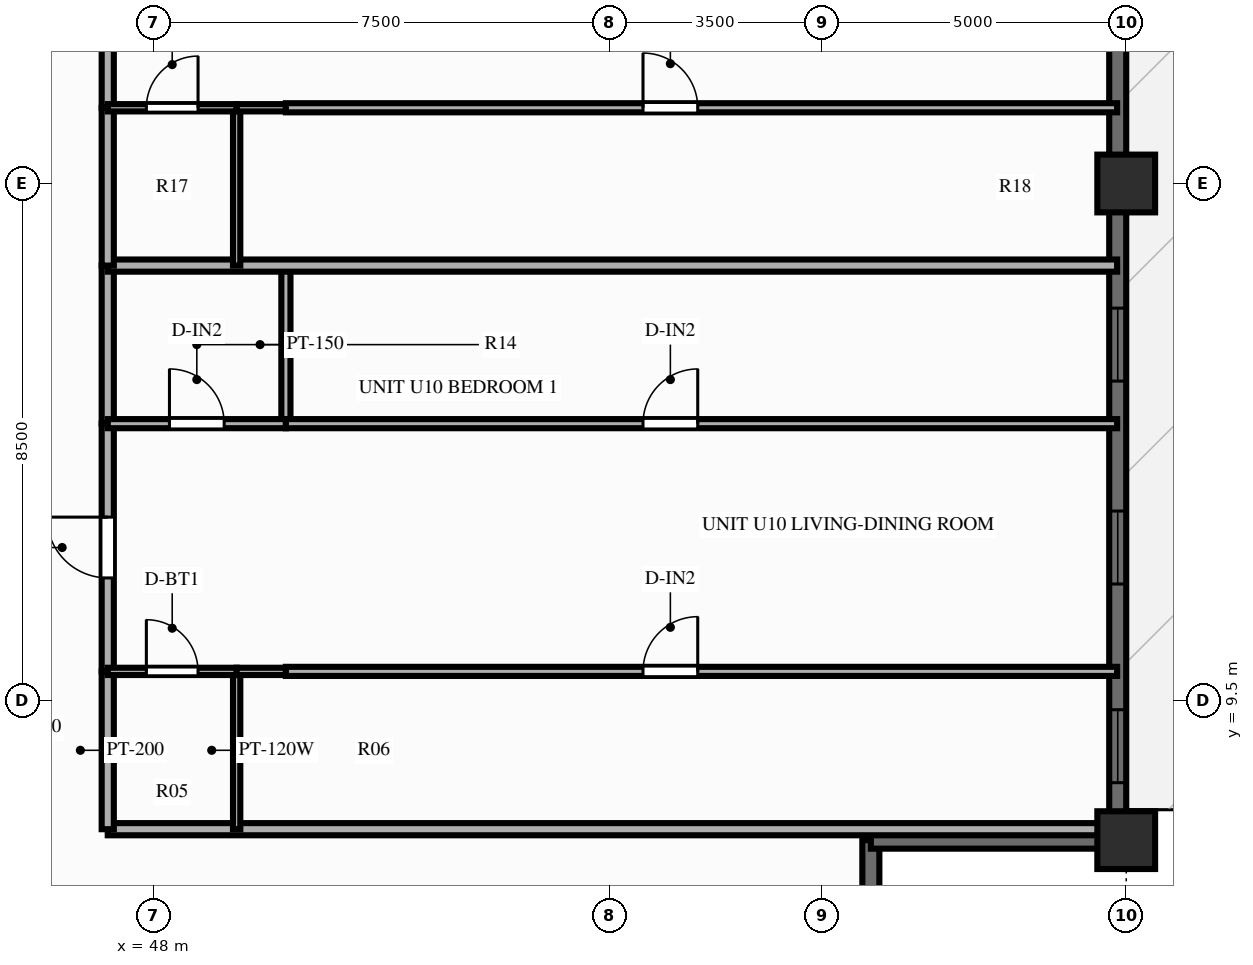
"""IFC4 building model, lengths in metres.
Left out: names, types, materials, properties, quantities, classifications, styles, units other than length and angle.
Written with IfcOpenShell. Run it as: python <this file> out.ifc"""

import sys

from ifc_helpers import new_model, si_unit, direction, frame, frame_2d, origin, origin_2d, place, context, subcontext, project, spatial, rectangle, extrude, source, transform, mapped, element, fill, save


model = new_model("IFC4")
c1 = context("Model", 3, precision=1e-05, world=origin(), true_north=direction((0.0, 1.0)))
c2 = subcontext(c1, "Body", "Model", "MODEL_VIEW")
j1 = project(units=[si_unit("LENGTHUNIT", "METRE"), si_unit("PLANEANGLEUNIT", "RADIAN")], contexts=[c1])
p1 = place(None, origin())
s1 = spatial("IfcSite", under=j1, at=p1, CompositionType="ELEMENT")
p2 = place(p1, origin())
s2 = spatial("IfcBuilding", under=s1, at=p2, CompositionType="ELEMENT")
p3 = place(p2, frame((0.0, 0.0, 104.85)))
s3 = spatial("IfcBuildingStorey", under=s2, at=p3, CompositionType="ELEMENT", Elevation=104.85)
m1 = source(origin(), c2, "Body", "SweptSolid", [
    extrude(rectangle(XDim=0.95, YDim=0.95, at=origin_2d()), origin(), (0.0, 0.0, 1.0), 3.0),
])
for number, where, z_axis, x_axis in (
    (1, (64.0, 7.2, 0.0), (0.0, 0.0, 1.0), (1.0, 0.0, 0.0)),
    (2, (64.0, 18.0, 0.0), (0.0, 0.0, 1.0), (1.0, 0.0, 0.0)),
):
    element("IfcColumn", number, at=place(p3, frame(where, z_axis=z_axis, x_axis=x_axis)), inside=s3, PredefinedType="COLUMN", context=c2, shape_type="MappedRepresentation", body=[
        mapped(m1, transform((0.0, 0.0, 0.0), scale=1.0)),
    ])
p4 = place(p3, frame((63.86, 7.2, 0.0), z_axis=(0.0, 0.0, 1.0), x_axis=(0.0, 1.0, 0.0)))
e3 = element("IfcWall", 3, at=p4, inside=s3, PredefinedType="SOLIDWALL", context=c2, shape_type="SweptSolid", body=[
    extrude(rectangle(XDim=39.6, YDim=0.28, at=frame_2d((19.8, 0.0))), origin(), (0.0, 0.0, 1.0), 2.28),
])
p5 = place(p4, frame((0.945, 0.0, 0.25)))
e4 = element("IfcOpeningElement", 4, at=p5, cuts=e3, PredefinedType="OPENING", context=c2, shape_type="SweptSolid", body=[
    extrude(rectangle(XDim=1.2, YDim=1.5, at=frame_2d((0.6, 0.75))), frame((0.0, 0.152, 0.0), z_axis=(0.0, -1.0, 0.0), x_axis=(1.0, 0.0, 0.0)), (0.0, 0.0, 1.0), 0.304),
])
p6 = place(p4, frame((4.213, 0.0, 0.25)))
e5 = element("IfcOpeningElement", 5, at=p6, cuts=e3, PredefinedType="OPENING", context=c2, shape_type="SweptSolid", body=[
    extrude(rectangle(XDim=1.2, YDim=1.5, at=frame_2d((0.6, 0.75))), frame((0.0, 0.152, 0.0), z_axis=(0.0, -1.0, 0.0), x_axis=(1.0, 0.0, 0.0)), (0.0, 0.0, 1.0), 0.304),
])
p7 = place(p4, frame((7.55, 0.0, 0.25)))
e6 = element("IfcOpeningElement", 6, at=p7, cuts=e3, PredefinedType="OPENING", context=c2, shape_type="SweptSolid", body=[
    extrude(rectangle(XDim=1.2, YDim=1.5, at=frame_2d((0.6, 0.75))), frame((0.0, 0.152, 0.0), z_axis=(0.0, -1.0, 0.0), x_axis=(1.0, 0.0, 0.0)), (0.0, 0.0, 1.0), 0.304),
])
p8 = place(p4, frame((13.483, 0.0, 0.25)))
e7 = element("IfcOpeningElement", 7, at=p8, cuts=e3, PredefinedType="OPENING", context=c2, shape_type="SweptSolid", body=[
    extrude(rectangle(XDim=1.2, YDim=1.5, at=frame_2d((0.6, 0.75))), frame((0.0, 0.152, 0.0), z_axis=(0.0, -1.0, 0.0), x_axis=(1.0, 0.0, 0.0)), (0.0, 0.0, 1.0), 0.304),
])
p9 = place(p4, frame((16.82, 0.0, 0.25)))
e8 = element("IfcOpeningElement", 8, at=p9, cuts=e3, PredefinedType="OPENING", context=c2, shape_type="SweptSolid", body=[
    extrude(rectangle(XDim=1.2, YDim=1.5, at=frame_2d((0.6, 0.75))), frame((0.0, 0.152, 0.0), z_axis=(0.0, -1.0, 0.0), x_axis=(1.0, 0.0, 0.0)), (0.0, 0.0, 1.0), 0.304),
])
p10 = place(p4, frame((19.2, 0.0, 0.25)))
e9 = element("IfcOpeningElement", 9, at=p10, cuts=e3, PredefinedType="OPENING", context=c2, shape_type="SweptSolid", body=[
    extrude(rectangle(XDim=1.2, YDim=1.5, at=frame_2d((0.6, 0.75))), frame((0.0, 0.152, 0.0), z_axis=(0.0, -1.0, 0.0), x_axis=(1.0, 0.0, 0.0)), (0.0, 0.0, 1.0), 0.304),
])
p11 = place(p4, frame((21.578, 0.0, 0.25)))
e10 = element("IfcOpeningElement", 10, at=p11, cuts=e3, PredefinedType="OPENING", context=c2, shape_type="SweptSolid", body=[
    extrude(rectangle(XDim=1.2, YDim=1.5, at=frame_2d((0.6, 0.75))), frame((0.0, 0.152, 0.0), z_axis=(0.0, -1.0, 0.0), x_axis=(1.0, 0.0, 0.0)), (0.0, 0.0, 1.0), 0.304),
])
p12 = place(p4, frame((26.313, 0.0, 0.0), z_axis=(0.0, 0.0, 1.0), x_axis=(-1.0, 0.0, 0.0)))
e11 = element("IfcOpeningElement", 11, at=p12, cuts=e3, PredefinedType="OPENING", context=c2, shape_type="SweptSolid", body=[
    extrude(rectangle(XDim=1.6, YDim=2.15, at=frame_2d((0.8, 1.075))), frame((0.0, 0.152, 0.0), z_axis=(0.0, -1.0, 0.0), x_axis=(1.0, 0.0, 0.0)), (0.0, 0.0, 1.0), 0.304),
])
p13 = place(p4, frame((29.305, 0.0, 0.25)))
e12 = element("IfcOpeningElement", 12, at=p13, cuts=e3, PredefinedType="OPENING", context=c2, shape_type="SweptSolid", body=[
    extrude(rectangle(XDim=0.7, YDim=1.5, at=frame_2d((0.35, 0.75))), frame((0.0, 0.152, 0.0), z_axis=(0.0, -1.0, 0.0), x_axis=(1.0, 0.0, 0.0)), (0.0, 0.0, 1.0), 0.304),
])
p14 = place(p4, frame((30.848, 0.0, 0.25)))
e13 = element("IfcOpeningElement", 13, at=p14, cuts=e3, PredefinedType="OPENING", context=c2, shape_type="SweptSolid", body=[
    extrude(rectangle(XDim=1.2, YDim=1.5, at=frame_2d((0.6, 0.75))), frame((0.0, 0.152, 0.0), z_axis=(0.0, -1.0, 0.0), x_axis=(1.0, 0.0, 0.0)), (0.0, 0.0, 1.0), 0.304),
])
p15 = place(p4, frame((34.183, 0.0, 0.25)))
e14 = element("IfcOpeningElement", 14, at=p15, cuts=e3, PredefinedType="OPENING", context=c2, shape_type="SweptSolid", body=[
    extrude(rectangle(XDim=1.2, YDim=1.5, at=frame_2d((0.6, 0.75))), frame((0.0, 0.152, 0.0), z_axis=(0.0, -1.0, 0.0), x_axis=(1.0, 0.0, 0.0)), (0.0, 0.0, 1.0), 0.304),
])
p16 = place(p4, frame((37.452, 0.0, 0.25)))
e15 = element("IfcOpeningElement", 15, at=p16, cuts=e3, PredefinedType="OPENING", context=c2, shape_type="SweptSolid", body=[
    extrude(rectangle(XDim=1.2, YDim=1.5, at=frame_2d((0.6, 0.75))), frame((0.0, 0.152, 0.0), z_axis=(0.0, -1.0, 0.0), x_axis=(1.0, 0.0, 0.0)), (0.0, 0.0, 1.0), 0.304),
])
for number, where, z_axis, x_axis in (
    (16, (59.8, 3.08, 0.0), (0.0, 0.0, 1.0), (0.0, 1.0, 0.0)),
    (17, (59.8, 7.2, 0.0), (0.0, 0.0, 1.0), (1.0, 0.0, 0.0)),
):
    element("IfcWall", number, at=place(p3, frame(where, z_axis=z_axis, x_axis=x_axis)), inside=s3, PredefinedType="SOLIDWALL", context=c2, shape_type="SweptSolid", body=[
        extrude(rectangle(XDim=4.12, YDim=0.28, at=frame_2d((2.06, 0.0))), origin(), (0.0, 0.0, 1.0), 2.28),
    ])
p17 = place(p3, frame((47.25, 7.38, 0.0), z_axis=(0.0, 0.0, 1.0), x_axis=(1.0, 0.0, 0.0)))
e18 = element("IfcWall", 18, at=p17, inside=s3, PredefinedType="PARTITIONING", context=c2, shape_type="SweptSolid", body=[
    extrude(rectangle(XDim=16.6, YDim=0.2, at=frame_2d((8.3, 0.0))), origin(), (0.0, 0.0, 1.0), 2.79),
])
p18 = place(p3, frame((47.25, 7.38, 0.0), z_axis=(0.0, 0.0, 1.0), x_axis=(0.0, 1.0, 0.0)))
e19 = element("IfcWall", 19, at=p18, inside=s3, PredefinedType="PARTITIONING", context=c2, shape_type="SweptSolid", body=[
    extrude(rectangle(XDim=2.596, YDim=0.2, at=frame_2d((1.298, 0.0))), origin(), (0.0, 0.0, 1.0), 2.79),
])
p19 = place(p3, frame((47.25, 9.976, 0.0), z_axis=(0.0, 0.0, 1.0), x_axis=(0.0, 1.0, 0.0)))
e20 = element("IfcWall", 20, at=p19, inside=s3, PredefinedType="PARTITIONING", context=c2, shape_type="SweptSolid", body=[
    extrude(rectangle(XDim=4.074, YDim=0.2, at=frame_2d((2.037, 0.0))), origin(), (0.0, 0.0, 1.0), 2.79),
])
p20 = place(p19, frame((1.537, 0.0, 0.0)))
e21 = element("IfcOpeningElement", 21, at=p20, cuts=e20, PredefinedType="OPENING", context=c2, shape_type="SweptSolid", body=[
    extrude(rectangle(XDim=1.0, YDim=2.15, at=frame_2d((0.5, 1.075))), frame((0.0, 0.112, 0.0), z_axis=(0.0, -1.0, 0.0), x_axis=(1.0, 0.0, 0.0)), (0.0, 0.0, 1.0), 0.224),
])
p21 = place(p3, frame((47.25, 14.05, 0.0), z_axis=(0.0, 0.0, 1.0), x_axis=(0.0, 1.0, 0.0)))
e22 = element("IfcWall", 22, at=p21, inside=s3, PredefinedType="PARTITIONING", context=c2, shape_type="SweptSolid", body=[
    extrude(rectangle(XDim=2.6, YDim=0.2, at=frame_2d((1.3, 0.0))), origin(), (0.0, 0.0, 1.0), 2.79),
])
p22 = place(p3, frame((49.37, 7.38, 0.0), z_axis=(0.0, 0.0, 1.0), x_axis=(0.0, 1.0, 0.0)))
e23 = element("IfcWall", 23, at=p22, inside=s3, PredefinedType="PARTITIONING", context=c2, shape_type="SweptSolid", body=[
    extrude(rectangle(XDim=2.596, YDim=0.12, at=frame_2d((1.298, 0.0))), origin(), (0.0, 0.0, 1.0), 2.79),
])
p23 = place(p3, frame((50.18, 14.05, 0.0), z_axis=(0.0, 0.0, 1.0), x_axis=(0.0, 1.0, 0.0)))
e24 = element("IfcWall", 24, at=p23, inside=s3, PredefinedType="PARTITIONING", context=c2, shape_type="SweptSolid", body=[
    extrude(rectangle(XDim=2.6, YDim=0.15, at=frame_2d((1.3, 0.0))), origin(), (0.0, 0.0, 1.0), 2.79),
])
p24 = place(p3, frame((47.25, 9.976, 0.0), z_axis=(0.0, 0.0, 1.0), x_axis=(1.0, 0.0, 0.0)))
e25 = element("IfcWall", 25, at=p24, inside=s3, PredefinedType="PARTITIONING", context=c2, shape_type="SweptSolid", body=[
    extrude(rectangle(XDim=2.12, YDim=0.12, at=frame_2d((1.06, 0.0))), origin(), (0.0, 0.0, 1.0), 2.79),
])
p25 = place(p24, frame((0.635, 0.0, 0.0)))
e26 = element("IfcOpeningElement", 26, at=p25, cuts=e25, PredefinedType="OPENING", context=c2, shape_type="SweptSolid", body=[
    extrude(rectangle(XDim=0.85, YDim=2.05, at=frame_2d((0.425, 1.025))), frame((0.0, 0.072, 0.0), z_axis=(0.0, -1.0, 0.0), x_axis=(1.0, 0.0, 0.0)), (0.0, 0.0, 1.0), 0.144),
])
p26 = place(p3, frame((49.37, 9.976, 0.0), z_axis=(0.0, 0.0, 1.0), x_axis=(1.0, 0.0, 0.0)))
e27 = element("IfcWall", 27, at=p26, inside=s3, PredefinedType="PARTITIONING", context=c2, shape_type="SweptSolid", body=[
    extrude(rectangle(XDim=0.81, YDim=0.12, at=frame_2d((0.405, 0.0))), origin(), (0.0, 0.0, 1.0), 2.79),
])
p27 = place(p3, frame((50.18, 9.976, 0.0), z_axis=(0.0, 0.0, 1.0), x_axis=(1.0, 0.0, 0.0)))
e28 = element("IfcWall", 28, at=p27, inside=s3, PredefinedType="PARTITIONING", context=c2, shape_type="SweptSolid", body=[
    extrude(rectangle(XDim=13.67, YDim=0.15, at=frame_2d((6.835, 0.0))), origin(), (0.0, 0.0, 1.0), 2.79),
])
p28 = place(p27, frame((5.873, 0.0, 0.0)))
e29 = element("IfcOpeningElement", 29, at=p28, cuts=e28, PredefinedType="OPENING", context=c2, shape_type="SweptSolid", body=[
    extrude(rectangle(XDim=0.9, YDim=2.1, at=frame_2d((0.45, 1.05))), frame((0.0, 0.087, 0.0), z_axis=(0.0, -1.0, 0.0), x_axis=(1.0, 0.0, 0.0)), (0.0, 0.0, 1.0), 0.174),
])
p29 = place(p3, frame((47.25, 14.05, 0.0), z_axis=(0.0, 0.0, 1.0), x_axis=(1.0, 0.0, 0.0)))
e30 = element("IfcWall", 30, at=p29, inside=s3, PredefinedType="PARTITIONING", context=c2, shape_type="SweptSolid", body=[
    extrude(rectangle(XDim=2.93, YDim=0.15, at=frame_2d((1.465, 0.0))), origin(), (0.0, 0.0, 1.0), 2.79),
])
p30 = place(p29, frame((1.015, 0.0, 0.0)))
e31 = element("IfcOpeningElement", 31, at=p30, cuts=e30, PredefinedType="OPENING", context=c2, shape_type="SweptSolid", body=[
    extrude(rectangle(XDim=0.9, YDim=2.1, at=frame_2d((0.45, 1.05))), frame((0.0, 0.087, 0.0), z_axis=(0.0, -1.0, 0.0), x_axis=(1.0, 0.0, 0.0)), (0.0, 0.0, 1.0), 0.174),
])
p31 = place(p3, frame((50.18, 14.05, 0.0), z_axis=(0.0, 0.0, 1.0), x_axis=(1.0, 0.0, 0.0)))
e32 = element("IfcWall", 32, at=p31, inside=s3, PredefinedType="PARTITIONING", context=c2, shape_type="SweptSolid", body=[
    extrude(rectangle(XDim=13.67, YDim=0.15, at=frame_2d((6.835, 0.0))), origin(), (0.0, 0.0, 1.0), 2.79),
])
p32 = place(p31, frame((5.873, 0.0, 0.0)))
e33 = element("IfcOpeningElement", 33, at=p32, cuts=e32, PredefinedType="OPENING", context=c2, shape_type="SweptSolid", body=[
    extrude(rectangle(XDim=0.9, YDim=2.1, at=frame_2d((0.45, 1.05))), frame((0.0, 0.087, 0.0), z_axis=(0.0, -1.0, 0.0), x_axis=(1.0, 0.0, 0.0)), (0.0, 0.0, 1.0), 0.174),
])
p33 = place(p3, frame((47.25, 16.65, 0.0), z_axis=(0.0, 0.0, 1.0), x_axis=(1.0, 0.0, 0.0)))
e34 = element("IfcWall", 34, at=p33, inside=s3, PredefinedType="PARTITIONING", context=c2, shape_type="SweptSolid", body=[
    extrude(rectangle(XDim=16.6, YDim=0.2, at=frame_2d((8.3, 0.0))), origin(), (0.0, 0.0, 1.0), 2.79),
])
p34 = place(p3, frame((47.25, 16.65, 0.0), z_axis=(0.0, 0.0, 1.0), x_axis=(0.0, 1.0, 0.0)))
e35 = element("IfcWall", 35, at=p34, inside=s3, PredefinedType="PARTITIONING", context=c2, shape_type="SweptSolid", body=[
    extrude(rectangle(XDim=2.596, YDim=0.2, at=frame_2d((1.298, 0.0))), origin(), (0.0, 0.0, 1.0), 2.79),
])
p35 = place(p3, frame((47.25, 19.246, 0.0), z_axis=(0.0, 0.0, 1.0), x_axis=(0.0, 1.0, 0.0)))
e36 = element("IfcWall", 36, at=p35, inside=s3, PredefinedType="PARTITIONING", context=c2, shape_type="SweptSolid", body=[
    extrude(rectangle(XDim=4.074, YDim=0.2, at=frame_2d((2.037, 0.0))), origin(), (0.0, 0.0, 1.0), 2.79),
])
p36 = place(p35, frame((1.537, 0.0, 0.0)))
e37 = element("IfcOpeningElement", 37, at=p36, cuts=e36, PredefinedType="OPENING", context=c2, shape_type="SweptSolid", body=[
    extrude(rectangle(XDim=1.0, YDim=2.15, at=frame_2d((0.5, 1.075))), frame((0.0, 0.112, 0.0), z_axis=(0.0, -1.0, 0.0), x_axis=(1.0, 0.0, 0.0)), (0.0, 0.0, 1.0), 0.224),
])
p37 = place(p3, frame((49.37, 16.65, 0.0), z_axis=(0.0, 0.0, 1.0), x_axis=(0.0, 1.0, 0.0)))
e38 = element("IfcWall", 38, at=p37, inside=s3, PredefinedType="PARTITIONING", context=c2, shape_type="SweptSolid", body=[
    extrude(rectangle(XDim=2.596, YDim=0.12, at=frame_2d((1.298, 0.0))), origin(), (0.0, 0.0, 1.0), 2.79),
])
p38 = place(p3, frame((47.25, 19.246, 0.0), z_axis=(0.0, 0.0, 1.0), x_axis=(1.0, 0.0, 0.0)))
e39 = element("IfcWall", 39, at=p38, inside=s3, PredefinedType="PARTITIONING", context=c2, shape_type="SweptSolid", body=[
    extrude(rectangle(XDim=2.12, YDim=0.12, at=frame_2d((1.06, 0.0))), origin(), (0.0, 0.0, 1.0), 2.79),
])
p39 = place(p38, frame((0.635, 0.0, 0.0)))
e40 = element("IfcOpeningElement", 40, at=p39, cuts=e39, PredefinedType="OPENING", context=c2, shape_type="SweptSolid", body=[
    extrude(rectangle(XDim=0.85, YDim=2.05, at=frame_2d((0.425, 1.025))), frame((0.0, 0.072, 0.0), z_axis=(0.0, -1.0, 0.0), x_axis=(1.0, 0.0, 0.0)), (0.0, 0.0, 1.0), 0.144),
])
p40 = place(p3, frame((49.37, 19.246, 0.0), z_axis=(0.0, 0.0, 1.0), x_axis=(1.0, 0.0, 0.0)))
e41 = element("IfcWall", 41, at=p40, inside=s3, PredefinedType="PARTITIONING", context=c2, shape_type="SweptSolid", body=[
    extrude(rectangle(XDim=0.81, YDim=0.12, at=frame_2d((0.405, 0.0))), origin(), (0.0, 0.0, 1.0), 2.79),
])
p41 = place(p3, frame((50.18, 19.246, 0.0), z_axis=(0.0, 0.0, 1.0), x_axis=(1.0, 0.0, 0.0)))
e42 = element("IfcWall", 42, at=p41, inside=s3, PredefinedType="PARTITIONING", context=c2, shape_type="SweptSolid", body=[
    extrude(rectangle(XDim=13.67, YDim=0.15, at=frame_2d((6.835, 0.0))), origin(), (0.0, 0.0, 1.0), 2.79),
])
p42 = place(p41, frame((5.873, 0.0, 0.0)))
e43 = element("IfcOpeningElement", 43, at=p42, cuts=e42, PredefinedType="OPENING", context=c2, shape_type="SweptSolid", body=[
    extrude(rectangle(XDim=0.9, YDim=2.1, at=frame_2d((0.45, 1.05))), frame((0.0, 0.087, 0.0), z_axis=(0.0, -1.0, 0.0), x_axis=(1.0, 0.0, 0.0)), (0.0, 0.0, 1.0), 0.174),
])
m2 = source(origin(), c2, "Body", "SweptSolid", [
    extrude(rectangle(XDim=1.2, YDim=1.5, at=frame_2d((0.6, 0.75))), frame((0.0, 0.03, 0.0), z_axis=(0.0, -1.0, 0.0), x_axis=(1.0, 0.0, 0.0)), (0.0, 0.0, 1.0), 0.06),
])
p43 = place(p5, origin())
e44 = element("IfcWindow", 44, at=p43, inside=s3, PartitioningType="SINGLE_PANEL", PredefinedType="WINDOW", context=c2, shape_type="MappedRepresentation", body=[
    mapped(m2, transform((0.0, 0.0, 0.0), scale=1.0)),
])
fill(e4, e44)
p44 = place(p6, origin())
e45 = element("IfcWindow", 45, at=p44, inside=s3, PartitioningType="SINGLE_PANEL", PredefinedType="WINDOW", context=c2, shape_type="MappedRepresentation", body=[
    mapped(m2, transform((0.0, 0.0, 0.0), scale=1.0)),
])
fill(e5, e45)
p45 = place(p7, origin())
e46 = element("IfcWindow", 46, at=p45, inside=s3, PartitioningType="SINGLE_PANEL", PredefinedType="WINDOW", context=c2, shape_type="MappedRepresentation", body=[
    mapped(m2, transform((0.0, 0.0, 0.0), scale=1.0)),
])
fill(e6, e46)
m3 = source(origin(), c2, "Body", "SweptSolid", [
    extrude(rectangle(XDim=1.0, YDim=2.15, at=frame_2d((0.5, 1.075))), frame((0.0, 0.025, 0.0), z_axis=(0.0, -1.0, 0.0), x_axis=(1.0, 0.0, 0.0)), (0.0, 0.0, 1.0), 0.05),
])
p46 = place(p20, origin())
e47 = element("IfcDoor", 47, at=p46, inside=s3, OperationType="SINGLE_SWING_RIGHT", PredefinedType="DOOR", context=c2, shape_type="MappedRepresentation", body=[
    mapped(m3, transform((0.0, 0.0, 0.0), scale=1.0)),
])
fill(e21, e47)
m4 = source(origin(), c2, "Body", "SweptSolid", [
    extrude(rectangle(XDim=0.85, YDim=2.05, at=frame_2d((0.425, 1.025))), frame((0.0, 0.025, 0.0), z_axis=(0.0, -1.0, 0.0), x_axis=(1.0, 0.0, 0.0)), (0.0, 0.0, 1.0), 0.05),
])
p47 = place(p25, origin())
e48 = element("IfcDoor", 48, at=p47, inside=s3, OperationType="SINGLE_SWING_LEFT", PredefinedType="DOOR", context=c2, shape_type="MappedRepresentation", body=[
    mapped(m4, transform((0.0, 0.0, 0.0), scale=1.0)),
])
fill(e26, e48)
m5 = source(origin(), c2, "Body", "SweptSolid", [
    extrude(rectangle(XDim=0.9, YDim=2.1, at=frame_2d((0.45, 1.05))), frame((0.0, 0.025, 0.0), z_axis=(0.0, -1.0, 0.0), x_axis=(1.0, 0.0, 0.0)), (0.0, 0.0, 1.0), 0.05),
])
p48 = place(p28, origin())
e49 = element("IfcDoor", 49, at=p48, inside=s3, OperationType="SINGLE_SWING_RIGHT", PredefinedType="DOOR", context=c2, shape_type="MappedRepresentation", body=[
    mapped(m5, transform((0.0, 0.0, 0.0), scale=1.0)),
])
fill(e29, e49)
p49 = place(p30, origin())
e50 = element("IfcDoor", 50, at=p49, inside=s3, OperationType="SINGLE_SWING_LEFT", PredefinedType="DOOR", context=c2, shape_type="MappedRepresentation", body=[
    mapped(m5, transform((0.0, 0.0, 0.0), scale=1.0)),
])
fill(e31, e50)
p50 = place(p32, origin())
e51 = element("IfcDoor", 51, at=p50, inside=s3, OperationType="SINGLE_SWING_RIGHT", PredefinedType="DOOR", context=c2, shape_type="MappedRepresentation", body=[
    mapped(m5, transform((0.0, 0.0, 0.0), scale=1.0)),
])
fill(e33, e51)
p51 = place(p39, origin())
e52 = element("IfcDoor", 52, at=p51, inside=s3, OperationType="SINGLE_SWING_RIGHT", PredefinedType="DOOR", context=c2, shape_type="MappedRepresentation", body=[
    mapped(m4, transform((0.0, 0.0, 0.0), scale=1.0)),
])
fill(e40, e52)
p52 = place(p42, origin())
e53 = element("IfcDoor", 53, at=p52, inside=s3, OperationType="SINGLE_SWING_LEFT", PredefinedType="DOOR", context=c2, shape_type="MappedRepresentation", body=[
    mapped(m5, transform((0.0, 0.0, 0.0), scale=1.0)),
])
fill(e43, e53)
save(model, sys.argv[1])
